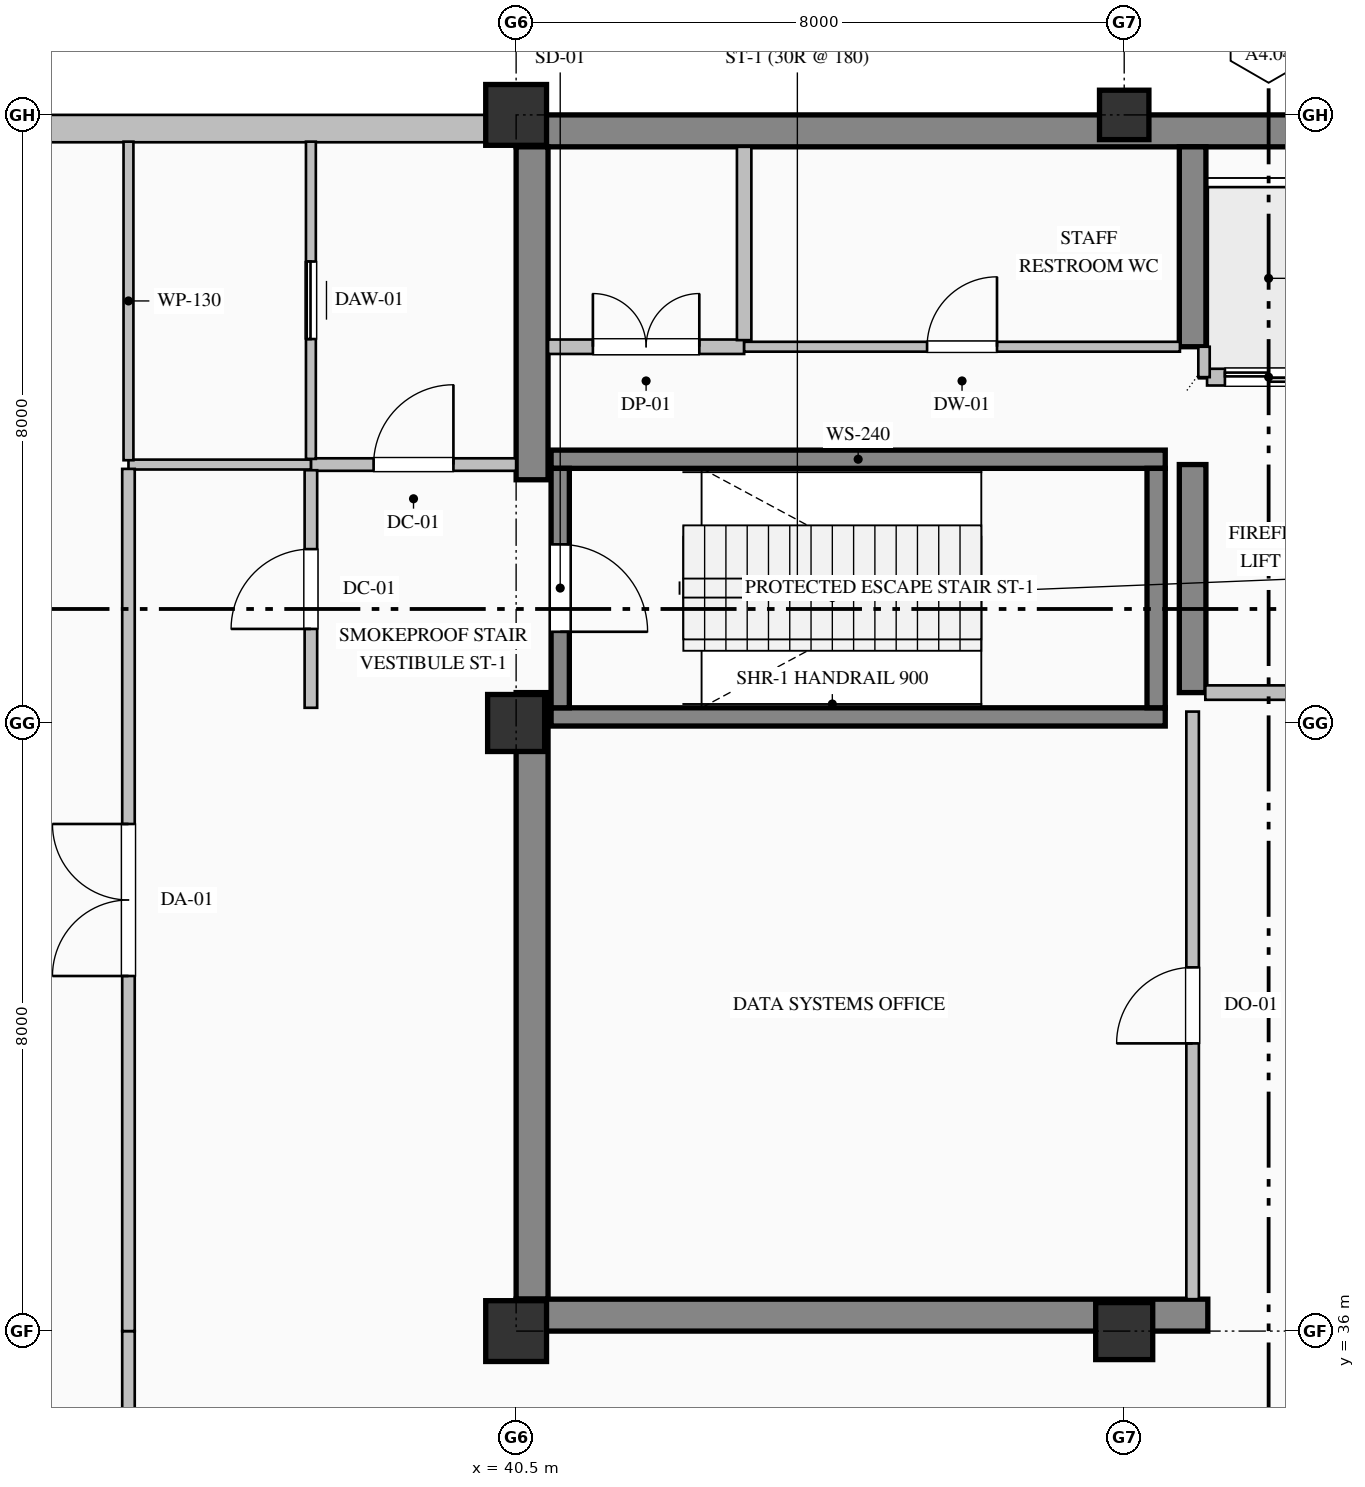
"""IFC4 building model, lengths in metres.
Left out: names, types, materials, properties, quantities, classifications, styles, units other than length and angle.
Written with IfcOpenShell. Run it as: python <this file> out.ifc"""

import sys

from ifc_helpers import new_model, si_unit, direction, frame, frame_2d, origin, origin_2d, place, context, subcontext, project, spatial, rectangle, hollow_rectangle, extrude, element, fill, save


model = new_model("IFC4")
c1 = context("Model", 3, precision=1e-05, world=origin(), true_north=direction((0.0, 1.0)))
c2 = subcontext(c1, "Body", "Model", "MODEL_VIEW")
j1 = project(units=[si_unit("LENGTHUNIT", "METRE"), si_unit("PLANEANGLEUNIT", "RADIAN")], contexts=[c1])
p1 = place(None, origin())
s1 = spatial("IfcSite", under=j1, at=p1, CompositionType="ELEMENT")
p2 = place(p1, origin())
s2 = spatial("IfcBuilding", under=s1, at=p2, CompositionType="ELEMENT")
p3 = place(p2, frame((0.0, 0.0, 378.4)))
s3 = spatial("IfcBuildingStorey", under=s2, at=p3, CompositionType="ELEMENT", Elevation=378.4)
p4 = place(p3, frame((40.5, 51.79, 0.0), z_axis=(0.0, 0.0, 1.0), x_axis=(1.0, 0.0, 0.0)))
e1 = element("IfcWall", 1, at=p4, inside=s3, PredefinedType="SHEAR", context=c2, shape_type="SweptSolid", body=[
    extrude(rectangle(XDim=23.5, YDim=0.42, at=frame_2d((11.75, 0.0))), origin(), (0.0, 0.0, 1.0), 4.95),
])
p5 = place(p3, frame((40.71, 36.42, 0.0), z_axis=(0.0, 0.0, 1.0), x_axis=(0.0, 1.0, 0.0)))
e2 = element("IfcWall", 2, at=p5, inside=s3, PredefinedType="SHEAR", context=c2, shape_type="SweptSolid", body=[
    extrude(rectangle(XDim=7.98, YDim=0.42, at=frame_2d((3.99, 0.0))), origin(), (0.0, 0.0, 1.0), 4.95),
])
p6 = place(p3, frame((40.71, 47.2, 0.0), z_axis=(0.0, 0.0, 1.0), x_axis=(0.0, 1.0, 0.0)))
e3 = element("IfcWall", 3, at=p6, inside=s3, PredefinedType="SHEAR", context=c2, shape_type="SweptSolid", body=[
    extrude(rectangle(XDim=4.38, YDim=0.42, at=frame_2d((2.19, 0.0))), origin(), (0.0, 0.0, 1.0), 4.95),
])
p7 = place(p3, frame((40.5, 36.21, 0.0), z_axis=(0.0, 0.0, 1.0), x_axis=(1.0, 0.0, 0.0)))
e4 = element("IfcWall", 4, at=p7, inside=s3, PredefinedType="SHEAR", context=c2, shape_type="SweptSolid", body=[
    extrude(rectangle(XDim=9.1, YDim=0.42, at=frame_2d((4.55, 0.0))), origin(), (0.0, 0.0, 1.0), 4.95),
])
p8 = place(p3, frame((49.4, 44.4, 0.0), z_axis=(0.0, 0.0, 1.0), x_axis=(0.0, 1.0, 0.0)))
e5 = element("IfcWall", 5, at=p8, inside=s3, PredefinedType="SHEAR", context=c2, shape_type="SweptSolid", body=[
    extrude(rectangle(XDim=3.0, YDim=0.35, at=frame_2d((1.5, 0.0))), origin(), (0.0, 0.0, 1.0), 4.95),
])
p9 = place(p3, frame((49.4, 48.95, 0.0), z_axis=(0.0, 0.0, 1.0), x_axis=(0.0, 1.0, 0.0)))
e6 = element("IfcWall", 6, at=p9, inside=s3, PredefinedType="SHEAR", context=c2, shape_type="SweptSolid", body=[
    extrude(rectangle(XDim=2.63, YDim=0.35, at=frame_2d((1.315, 0.0))), origin(), (0.0, 0.0, 1.0), 4.95),
])
p10 = place(p3, frame((40.5, 36.0, 0.0), z_axis=(0.0, 0.0, 1.0), x_axis=(1.0, 0.0, 0.0)))
e7 = element("IfcColumn", 7, at=p10, inside=s3, PredefinedType="COLUMN", context=c2, shape_type="SweptSolid", body=[
    extrude(hollow_rectangle(XDim=0.8, YDim=0.8, WallThickness=0.032, at=origin_2d()), origin(), (0.0, 0.0, 1.0), 5.4),
])
p11 = place(p3, frame((40.5, 44.0, 0.0), z_axis=(0.0, 0.0, 1.0), x_axis=(1.0, 0.0, 0.0)))
e8 = element("IfcColumn", 8, at=p11, inside=s3, PredefinedType="COLUMN", context=c2, shape_type="SweptSolid", body=[
    extrude(rectangle(XDim=0.75, YDim=0.75, at=origin_2d()), origin(), (0.0, 0.0, 1.0), 5.4),
])
p12 = place(p3, frame((40.5, 52.0, 0.0), z_axis=(0.0, 0.0, 1.0), x_axis=(1.0, 0.0, 0.0)))
e9 = element("IfcColumn", 9, at=p12, inside=s3, PredefinedType="COLUMN", context=c2, shape_type="SweptSolid", body=[
    extrude(hollow_rectangle(XDim=0.8, YDim=0.8, WallThickness=0.032, at=origin_2d()), origin(), (0.0, 0.0, 1.0), 5.4),
])
p13 = place(p3, frame((48.5, 36.0, 0.0), z_axis=(0.0, 0.0, 1.0), x_axis=(1.0, 0.0, 0.0)))
e10 = element("IfcColumn", 10, at=p13, inside=s3, PredefinedType="COLUMN", context=c2, shape_type="SweptSolid", body=[
    extrude(rectangle(XDim=0.75, YDim=0.75, at=origin_2d()), origin(), (0.0, 0.0, 1.0), 5.4),
])
p14 = place(p3, frame((48.5, 52.0, 0.0), z_axis=(0.0, 0.0, 1.0), x_axis=(1.0, 0.0, 0.0)))
e11 = element("IfcColumn", 11, at=p14, inside=s3, PredefinedType="COLUMN", context=c2, shape_type="SweptSolid", body=[
    extrude(hollow_rectangle(XDim=0.65, YDim=0.65, WallThickness=0.028, at=origin_2d()), origin(), (0.0, 0.0, 1.0), 5.4),
])
p15 = place(p3, frame((20.5, 51.82, 0.0), z_axis=(0.0, 0.0, 1.0), x_axis=(1.0, 0.0, 0.0)))
e12 = element("IfcWall", 12, at=p15, inside=s3, PredefinedType="SOLIDWALL", context=c2, shape_type="SweptSolid", body=[
    extrude(rectangle(XDim=20.02, YDim=0.36, at=frame_2d((10.01, 0.0))), origin(), (0.0, 0.0, 1.0), 4.5),
])
p16 = place(p15, frame((6.675, 0.0, 0.8)))
e13 = element("IfcOpeningElement", 13, at=p16, cuts=e12, PredefinedType="OPENING", context=c2, shape_type="SweptSolid", body=[
    extrude(rectangle(XDim=1.05, YDim=2.15, at=frame_2d((0.525, 1.075))), frame((0.0, 0.19, 0.0), z_axis=(0.0, -1.0, 0.0), x_axis=(1.0, 0.0, 0.0)), (0.0, 0.0, 1.0), 0.38),
])
for number, where, z_axis, x_axis in (
    (14, (40.96, 47.47, 0.0), (0.0, 0.0, 1.0), (1.0, 0.0, 0.0)),
    (15, (49.04, 44.08, 0.0), (0.0, 0.0, 1.0), (-1.0, 0.0, 0.0)),
):
    element("IfcWall", number, at=place(p3, frame(where, z_axis=z_axis, x_axis=x_axis)), inside=s3, PredefinedType="SOLIDWALL", context=c2, shape_type="SweptSolid", body=[
        extrude(rectangle(XDim=8.08, YDim=0.24, at=frame_2d((4.04, 0.0))), origin(), (0.0, 0.0, 1.0), 5.4),
    ])
p17 = place(p3, frame((41.08, 47.35, 0.0), z_axis=(0.0, 0.0, 1.0), x_axis=(0.0, -1.0, 0.0)))
e16 = element("IfcWall", 16, at=p17, inside=s3, PredefinedType="SOLIDWALL", context=c2, shape_type="SweptSolid", body=[
    extrude(rectangle(XDim=3.15, YDim=0.24, at=frame_2d((1.575, 0.0))), origin(), (0.0, 0.0, 1.0), 5.4),
])
p18 = place(p17, frame((1.0, 0.0, 0.0)))
e17 = element("IfcOpeningElement", 17, at=p18, cuts=e16, PredefinedType="OPENING", context=c2, shape_type="SweptSolid", body=[
    extrude(rectangle(XDim=1.15, YDim=2.2, at=frame_2d((0.575, 1.1))), frame((0.0, 0.13, 0.0), z_axis=(0.0, -1.0, 0.0), x_axis=(1.0, 0.0, 0.0)), (0.0, 0.0, 1.0), 0.26),
])
p19 = place(p3, frame((48.92, 44.2, 0.0), z_axis=(0.0, 0.0, 1.0), x_axis=(0.0, 1.0, 0.0)))
e18 = element("IfcWall", 18, at=p19, inside=s3, PredefinedType="SOLIDWALL", context=c2, shape_type="SweptSolid", body=[
    extrude(rectangle(XDim=3.15, YDim=0.24, at=frame_2d((1.575, 0.0))), origin(), (0.0, 0.0, 1.0), 5.4),
])
p20 = place(p3, frame((54.71, 48.55, 0.0), z_axis=(0.0, 0.0, 1.0), x_axis=(-1.0, 0.0, 0.0)))
e19 = element("IfcWall", 19, at=p20, inside=s3, PredefinedType="PARTITIONING", context=c2, shape_type="SweptSolid", body=[
    extrude(rectangle(XDim=5.12, YDim=0.22, at=frame_2d((2.56, 0.0))), origin(), (0.0, 0.0, 1.0), 4.95),
])
p21 = place(p20, frame((3.735, 0.0, 0.0)))
e20 = element("IfcOpeningElement", 20, at=p21, cuts=e19, PredefinedType="OPENING", context=c2, shape_type="SweptSolid", body=[
    extrude(rectangle(XDim=1.15, YDim=2.2, at=frame_2d((0.575, 1.1))), frame((0.0, 0.12, 0.0), z_axis=(0.0, -1.0, 0.0), x_axis=(1.0, 0.0, 0.0)), (0.0, 0.0, 1.0), 0.24),
])
p22 = place(p20, frame((0.935, 0.0, 0.0)))
e21 = element("IfcOpeningElement", 21, at=p22, cuts=e19, PredefinedType="OPENING", context=c2, shape_type="SweptSolid", body=[
    extrude(rectangle(XDim=1.15, YDim=2.2, at=frame_2d((0.575, 1.1))), frame((0.0, 0.12, 0.0), z_axis=(0.0, -1.0, 0.0), x_axis=(1.0, 0.0, 0.0)), (0.0, 0.0, 1.0), 0.24),
])
p23 = place(p3, frame((49.55, 48.55, 0.0), z_axis=(0.0, 0.0, 1.0), x_axis=(0.0, 1.0, 0.0)))
e22 = element("IfcWall", 22, at=p23, inside=s3, PredefinedType="PARTITIONING", context=c2, shape_type="SweptSolid", body=[
    extrude(rectangle(XDim=0.4, YDim=0.15, at=frame_2d((0.2, 0.0))), origin(), (0.0, 0.0, 1.0), 4.95),
])
p24 = place(p3, frame((37.8, 47.4, 0.0), z_axis=(0.0, 0.0, 1.0), x_axis=(1.0, 0.0, 0.0)))
e23 = element("IfcWall", 23, at=p24, inside=s3, PredefinedType="PARTITIONING", context=c2, shape_type="SweptSolid", body=[
    extrude(rectangle(XDim=2.7, YDim=0.165, at=frame_2d((1.35, 0.0))), origin(), (0.0, 0.0, 1.0), 4.95),
])
p25 = place(p24, frame((0.825, 0.0, 0.0)))
e24 = element("IfcOpeningElement", 24, at=p25, cuts=e23, PredefinedType="OPENING", context=c2, shape_type="SweptSolid", body=[
    extrude(rectangle(XDim=1.05, YDim=2.15, at=frame_2d((0.525, 1.075))), frame((0.0, 0.093, 0.0), z_axis=(0.0, -1.0, 0.0), x_axis=(1.0, 0.0, 0.0)), (0.0, 0.0, 1.0), 0.185),
])
p26 = place(p3, frame((37.8, 44.2, 0.0), z_axis=(0.0, 0.0, 1.0), x_axis=(0.0, 1.0, 0.0)))
e25 = element("IfcWall", 25, at=p26, inside=s3, PredefinedType="PARTITIONING", context=c2, shape_type="SweptSolid", body=[
    extrude(rectangle(XDim=3.125, YDim=0.165, at=frame_2d((1.563, 0.0))), origin(), (0.0, 0.0, 1.0), 4.95),
])
p27 = place(p26, frame((1.038, 0.0, 0.0)))
e26 = element("IfcOpeningElement", 26, at=p27, cuts=e25, PredefinedType="OPENING", context=c2, shape_type="SweptSolid", body=[
    extrude(rectangle(XDim=1.05, YDim=2.15, at=frame_2d((0.525, 1.075))), frame((0.0, 0.093, 0.0), z_axis=(0.0, -1.0, 0.0), x_axis=(1.0, 0.0, 0.0)), (0.0, 0.0, 1.0), 0.185),
])
p28 = place(p3, frame((37.8, 47.475, 0.0), z_axis=(0.0, 0.0, 1.0), x_axis=(0.0, 1.0, 0.0)))
e27 = element("IfcWall", 27, at=p28, inside=s3, PredefinedType="PARTITIONING", context=c2, shape_type="SweptSolid", body=[
    extrude(rectangle(XDim=4.173, YDim=0.13, at=frame_2d((2.087, 0.0))), origin(), (0.0, 0.0, 1.0), 4.95),
])
p29 = place(p28, frame((1.577, 0.0, 0.0)))
e28 = element("IfcOpeningElement", 28, at=p29, cuts=e27, PredefinedType="OPENING", context=c2, shape_type="SweptSolid", body=[
    extrude(rectangle(XDim=1.02, YDim=2.15, at=frame_2d((0.51, 1.075))), frame((0.0, 0.075, 0.0), z_axis=(0.0, -1.0, 0.0), x_axis=(1.0, 0.0, 0.0)), (0.0, 0.0, 1.0), 0.15),
])
p30 = place(p3, frame((37.8, 47.4, 0.0), z_axis=(0.0, 0.0, 1.0), x_axis=(-1.0, 0.0, 0.0)))
e29 = element("IfcWall", 29, at=p30, inside=s3, PredefinedType="PARTITIONING", context=c2, shape_type="SweptSolid", body=[
    extrude(rectangle(XDim=2.4, YDim=0.13, at=frame_2d((1.2, 0.0))), origin(), (0.0, 0.0, 1.0), 4.95),
])
p31 = place(p3, frame((35.4, 47.457, 0.0), z_axis=(0.0, 0.0, 1.0), x_axis=(0.0, 1.0, 0.0)))
e30 = element("IfcWall", 30, at=p31, inside=s3, PredefinedType="PARTITIONING", context=c2, shape_type="SweptSolid", body=[
    extrude(rectangle(XDim=4.191, YDim=0.13, at=frame_2d((2.095, 0.0))), origin(), (0.0, 0.0, 1.0), 4.95),
])
p32 = place(p3, frame((40.92, 48.95, 0.0), z_axis=(0.0, 0.0, 1.0), x_axis=(1.0, 0.0, 0.0)))
e31 = element("IfcWall", 31, at=p32, inside=s3, PredefinedType="PARTITIONING", context=c2, shape_type="SweptSolid", body=[
    extrude(rectangle(XDim=2.58, YDim=0.19, at=frame_2d((1.29, 0.0))), origin(), (0.0, 0.0, 1.0), 4.95),
])
p33 = place(p32, frame((0.59, 0.0, 0.0)))
e32 = element("IfcOpeningElement", 32, at=p33, cuts=e31, PredefinedType="OPENING", context=c2, shape_type="SweptSolid", body=[
    extrude(rectangle(XDim=1.4, YDim=2.25, at=frame_2d((0.7, 1.125))), frame((0.0, 0.105, 0.0), z_axis=(0.0, -1.0, 0.0), x_axis=(1.0, 0.0, 0.0)), (0.0, 0.0, 1.0), 0.21),
])
p34 = place(p3, frame((43.5, 48.95, 0.0), z_axis=(0.0, 0.0, 1.0), x_axis=(1.0, 0.0, 0.0)))
e33 = element("IfcWall", 33, at=p34, inside=s3, PredefinedType="PARTITIONING", context=c2, shape_type="SweptSolid", body=[
    extrude(rectangle(XDim=5.733, YDim=0.13, at=frame_2d((2.866, 0.0))), origin(), (0.0, 0.0, 1.0), 4.95),
])
p35 = place(p34, frame((2.406, 0.0, 0.0)))
e34 = element("IfcOpeningElement", 34, at=p35, cuts=e33, PredefinedType="OPENING", context=c2, shape_type="SweptSolid", body=[
    extrude(rectangle(XDim=0.92, YDim=2.15, at=frame_2d((0.46, 1.075))), frame((0.0, 0.075, 0.0), z_axis=(0.0, -1.0, 0.0), x_axis=(1.0, 0.0, 0.0)), (0.0, 0.0, 1.0), 0.15),
])
p36 = place(p3, frame((54.733, 44.4, 0.0), z_axis=(0.0, 0.0, 1.0), x_axis=(-1.0, 0.0, 0.0)))
e35 = element("IfcWall", 35, at=p36, inside=s3, PredefinedType="PARTITIONING", context=c2, shape_type="SweptSolid", body=[
    extrude(rectangle(XDim=5.166, YDim=0.19, at=frame_2d((2.583, 0.0))), origin(), (0.0, 0.0, 1.0), 4.95),
])
p37 = place(p36, frame((2.058, 0.0, 0.0)))
e36 = element("IfcOpeningElement", 36, at=p37, cuts=e35, PredefinedType="OPENING", context=c2, shape_type="SweptSolid", body=[
    extrude(rectangle(XDim=1.05, YDim=2.15, at=frame_2d((0.525, 1.075))), frame((0.0, 0.105, 0.0), z_axis=(0.0, -1.0, 0.0), x_axis=(1.0, 0.0, 0.0)), (0.0, 0.0, 1.0), 0.21),
])
p38 = place(p3, frame((49.4, 36.42, 0.0), z_axis=(0.0, 0.0, 1.0), x_axis=(0.0, 1.0, 0.0)))
e37 = element("IfcWall", 37, at=p38, inside=s3, PredefinedType="PARTITIONING", context=c2, shape_type="SweptSolid", body=[
    extrude(rectangle(XDim=7.73, YDim=0.165, at=frame_2d((3.865, 0.0))), origin(), (0.0, 0.0, 1.0), 4.192),
])
p39 = place(p38, frame((3.365, 0.0, 0.0)))
e38 = element("IfcOpeningElement", 38, at=p39, cuts=e37, PredefinedType="OPENING", context=c2, shape_type="SweptSolid", body=[
    extrude(rectangle(XDim=1.0, YDim=2.15, at=frame_2d((0.5, 1.075))), frame((0.0, 0.093, 0.0), z_axis=(0.0, -1.0, 0.0), x_axis=(1.0, 0.0, 0.0)), (0.0, 0.0, 1.0), 0.185),
])
p40 = place(p3, frame((43.5, 51.58, 0.0), z_axis=(0.0, 0.0, 1.0), x_axis=(0.0, -1.0, 0.0)))
e39 = element("IfcWall", 39, at=p40, inside=s3, PredefinedType="PARTITIONING", context=c2, shape_type="SweptSolid", body=[
    extrude(rectangle(XDim=2.543, YDim=0.19, at=frame_2d((1.271, 0.0))), origin(), (0.0, 0.0, 1.0), 4.95),
])
p41 = place(p3, frame((35.4, 33.6, 0.0), z_axis=(0.0, 0.0, 1.0), x_axis=(0.0, 1.0, 0.0)))
e40 = element("IfcWall", 40, at=p41, inside=s3, PredefinedType="PARTITIONING", context=c2, shape_type="SweptSolid", body=[
    extrude(rectangle(XDim=2.4, YDim=0.165, at=frame_2d((1.2, 0.0))), origin(), (0.0, 0.0, 1.0), 4.95),
])
p42 = place(p3, frame((35.4, 36.0, 0.0), z_axis=(0.0, 0.0, 1.0), x_axis=(0.0, 1.0, 0.0)))
e41 = element("IfcWall", 41, at=p42, inside=s3, PredefinedType="PARTITIONING", context=c2, shape_type="SweptSolid", body=[
    extrude(rectangle(XDim=11.343, YDim=0.165, at=frame_2d((5.671, 0.0))), origin(), (0.0, 0.0, 1.0), 4.95),
])
p43 = place(p42, frame((4.671, 0.0, 0.0)))
e42 = element("IfcOpeningElement", 42, at=p43, cuts=e41, PredefinedType="OPENING", context=c2, shape_type="SweptSolid", body=[
    extrude(rectangle(XDim=2.0, YDim=2.4, at=frame_2d((1.0, 1.2))), frame((0.0, 0.093, 0.0), z_axis=(0.0, -1.0, 0.0), x_axis=(1.0, 0.0, 0.0)), (0.0, 0.0, 1.0), 0.185),
])
p44 = place(p18, origin())
e43 = element("IfcDoor", 43, at=p44, inside=s3, OperationType="SINGLE_SWING_RIGHT", PredefinedType="DOOR", context=c2, shape_type="SweptSolid", body=[
    extrude(rectangle(XDim=1.15, YDim=2.2, at=frame_2d((0.575, 1.1))), frame((0.0, 0.025, 0.0), z_axis=(0.0, -1.0, 0.0), x_axis=(1.0, 0.0, 0.0)), (0.0, 0.0, 1.0), 0.05),
])
fill(e17, e43)
p45 = place(p21, origin())
e44 = element("IfcDoor", 44, at=p45, inside=s3, OperationType="DOUBLE_DOOR_SLIDING", PredefinedType="DOOR", context=c2, shape_type="SweptSolid", body=[
    extrude(rectangle(XDim=1.15, YDim=2.2, at=frame_2d((0.575, 1.1))), frame((0.0, 0.025, 0.0), z_axis=(0.0, -1.0, 0.0), x_axis=(1.0, 0.0, 0.0)), (0.0, 0.0, 1.0), 0.05),
])
fill(e20, e44)
p46 = place(p27, origin())
e45 = element("IfcDoor", 45, at=p46, inside=s3, OperationType="SINGLE_SWING_LEFT", PredefinedType="DOOR", context=c2, shape_type="SweptSolid", body=[
    extrude(rectangle(XDim=1.05, YDim=2.15, at=frame_2d((0.525, 1.075))), frame((0.0, 0.025, 0.0), z_axis=(0.0, -1.0, 0.0), x_axis=(1.0, 0.0, 0.0)), (0.0, 0.0, 1.0), 0.05),
])
fill(e26, e45)
p47 = place(p25, origin())
e46 = element("IfcDoor", 46, at=p47, inside=s3, OperationType="SINGLE_SWING_RIGHT", PredefinedType="DOOR", context=c2, shape_type="SweptSolid", body=[
    extrude(rectangle(XDim=1.05, YDim=2.15, at=frame_2d((0.525, 1.075))), frame((0.0, 0.025, 0.0), z_axis=(0.0, -1.0, 0.0), x_axis=(1.0, 0.0, 0.0)), (0.0, 0.0, 1.0), 0.05),
])
fill(e24, e46)
p48 = place(p29, origin())
e47 = element("IfcDoor", 47, at=p48, inside=s3, OperationType="SLIDING_TO_LEFT", PredefinedType="DOOR", context=c2, shape_type="SweptSolid", body=[
    extrude(rectangle(XDim=1.02, YDim=2.15, at=frame_2d((0.51, 1.075))), frame((0.0, 0.025, 0.0), z_axis=(0.0, -1.0, 0.0), x_axis=(1.0, 0.0, 0.0)), (0.0, 0.0, 1.0), 0.05),
])
fill(e28, e47)
p49 = place(p39, origin())
e48 = element("IfcDoor", 48, at=p49, inside=s3, OperationType="SINGLE_SWING_LEFT", PredefinedType="DOOR", context=c2, shape_type="SweptSolid", body=[
    extrude(rectangle(XDim=1.0, YDim=2.15, at=frame_2d((0.5, 1.075))), frame((0.0, 0.025, 0.0), z_axis=(0.0, -1.0, 0.0), x_axis=(1.0, 0.0, 0.0)), (0.0, 0.0, 1.0), 0.05),
])
fill(e38, e48)
p50 = place(p33, origin())
e49 = element("IfcDoor", 49, at=p50, inside=s3, OperationType="DOUBLE_DOOR_SINGLE_SWING", PredefinedType="DOOR", context=c2, shape_type="SweptSolid", body=[
    extrude(rectangle(XDim=1.4, YDim=2.25, at=frame_2d((0.7, 1.125))), frame((0.0, 0.025, 0.0), z_axis=(0.0, -1.0, 0.0), x_axis=(1.0, 0.0, 0.0)), (0.0, 0.0, 1.0), 0.05),
])
fill(e32, e49)
p51 = place(p35, origin())
e50 = element("IfcDoor", 50, at=p51, inside=s3, OperationType="SINGLE_SWING_RIGHT", PredefinedType="DOOR", context=c2, shape_type="SweptSolid", body=[
    extrude(rectangle(XDim=0.92, YDim=2.15, at=frame_2d((0.46, 1.075))), frame((0.0, 0.025, 0.0), z_axis=(0.0, -1.0, 0.0), x_axis=(1.0, 0.0, 0.0)), (0.0, 0.0, 1.0), 0.05),
])
fill(e34, e50)
p52 = place(p43, origin())
e51 = element("IfcDoor", 51, at=p52, inside=s3, OperationType="DOUBLE_DOOR_SINGLE_SWING", PredefinedType="DOOR", context=c2, shape_type="SweptSolid", body=[
    extrude(rectangle(XDim=2.0, YDim=2.4, at=frame_2d((1.0, 1.2))), frame((0.0, 0.025, 0.0), z_axis=(0.0, -1.0, 0.0), x_axis=(1.0, 0.0, 0.0)), (0.0, 0.0, 1.0), 0.05),
])
fill(e42, e51)
save(model, sys.argv[1])
